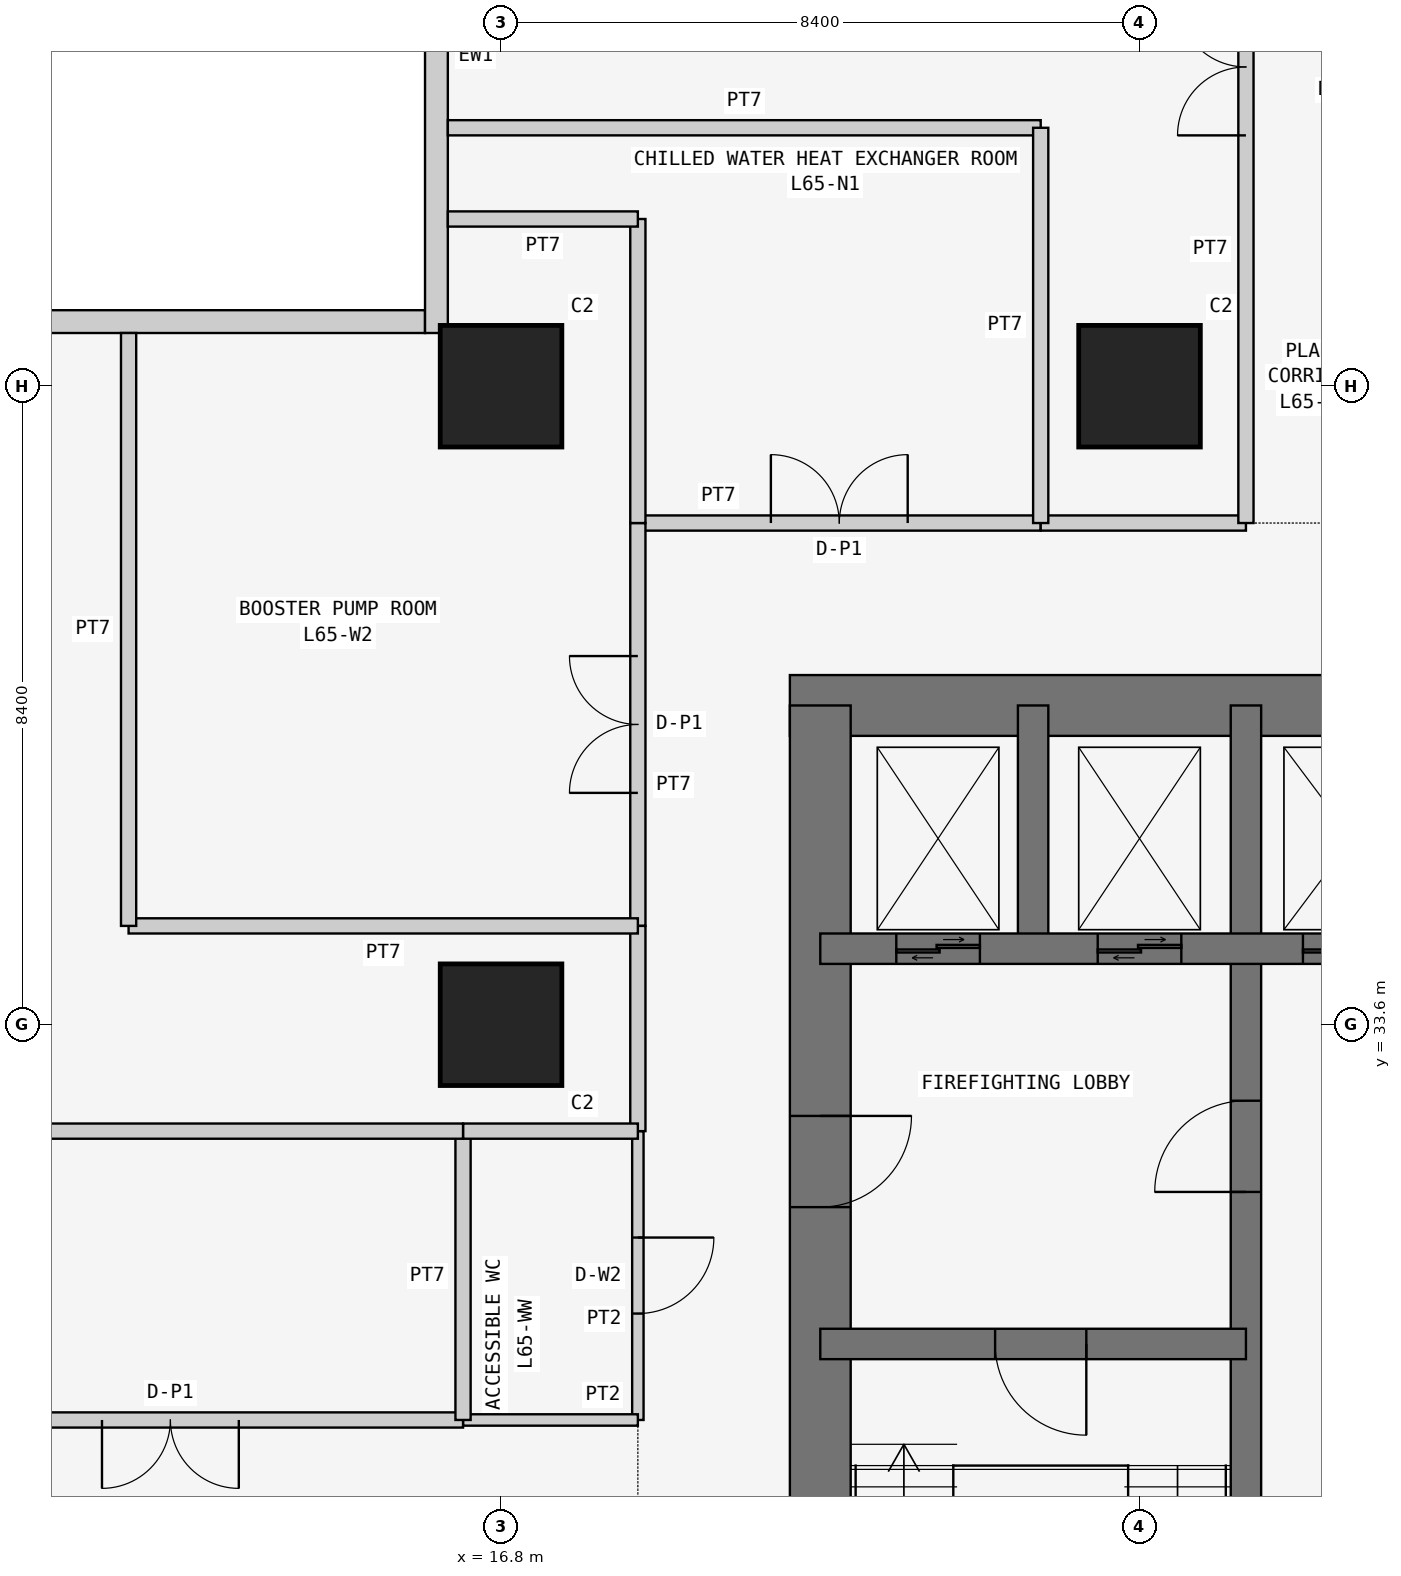
"""IFC4 building model, lengths in metres.
Left out: names, types, materials, properties, quantities, classifications, styles, units other than length and angle.
Written with IfcOpenShell. Run it as: python <this file> out.ifc"""

import sys

from ifc_helpers import new_model, si_unit, direction, frame, frame_2d, origin, origin_2d, place, context, subcontext, project, spatial, rectangle, extrude, element, fill, save


model = new_model("IFC4")
c1 = context("Model", 3, precision=1e-05, world=origin(), true_north=direction((0.0, 1.0)))
c2 = subcontext(c1, "Body", "Model", "MODEL_VIEW")
j1 = project(units=[si_unit("LENGTHUNIT", "METRE"), si_unit("PLANEANGLEUNIT", "RADIAN")], contexts=[c1])
p1 = place(None, origin())
s1 = spatial("IfcSite", under=j1, at=p1, CompositionType="ELEMENT")
p2 = place(p1, origin())
s2 = spatial("IfcBuilding", under=s1, at=p2, CompositionType="ELEMENT")
p3 = place(p2, frame((0.0, 0.0, 248.1)))
s3 = spatial("IfcBuildingStorey", under=s2, at=p3, CompositionType="ELEMENT", Elevation=248.1)
for number, where, z_axis, x_axis in (
    (1, (16.8, 33.6, 0.0), (0.0, 0.0, 1.0), (1.0, 0.0, 0.0)),
    (2, (16.8, 42.0, 0.0), (0.0, 0.0, 1.0), (1.0, 0.0, 0.0)),
    (3, (25.2, 42.0, 0.0), (0.0, 0.0, 1.0), (1.0, 0.0, 0.0)),
):
    element("IfcColumn", number, at=place(p3, frame(where, z_axis=z_axis, x_axis=x_axis)), inside=s3, PredefinedType="COLUMN", context=c2, shape_type="SweptSolid", body=[
        extrude(rectangle(XDim=1.6, YDim=1.6, at=origin_2d()), origin(), (0.0, 0.0, 1.0), 6.0),
    ])
p4 = place(p3, frame((37.8, 37.8, 0.0), z_axis=(0.0, 0.0, 1.0), x_axis=(-1.0, 0.0, 0.0)))
e4 = element("IfcWall", 4, at=p4, inside=s3, PredefinedType="SHEAR", context=c2, shape_type="SweptSolid", body=[
    extrude(rectangle(XDim=17.2, YDim=0.8, at=frame_2d((8.6, 0.0))), origin(), (0.0, 0.0, 1.0), 6.0),
])
p5 = place(p3, frame((21.0, 37.8, 0.0), z_axis=(0.0, 0.0, 1.0), x_axis=(0.0, -1.0, 0.0)))
e5 = element("IfcWall", 5, at=p5, inside=s3, PredefinedType="SHEAR", context=c2, shape_type="SweptSolid", body=[
    extrude(rectangle(XDim=17.2, YDim=0.8, at=frame_2d((8.6, 0.0))), origin(), (0.0, 0.0, 1.0), 6.0),
])
p6 = place(p5, frame((5.4, 0.0, 0.0)))
e6 = element("IfcOpeningElement", 6, at=p6, cuts=e5, PredefinedType="OPENING", context=c2, shape_type="SweptSolid", body=[
    extrude(rectangle(XDim=1.2, YDim=2.1, at=frame_2d((0.6, 1.05))), frame((0.0, 0.41, 0.0), z_axis=(0.0, -1.0, 0.0), x_axis=(1.0, 0.0, 0.0)), (0.0, 0.0, 1.0), 0.82),
])
p7 = place(p3, frame((26.6, 21.0, 0.0), z_axis=(0.0, 0.0, 1.0), x_axis=(0.0, 1.0, 0.0)))
e7 = element("IfcWall", 7, at=p7, inside=s3, PredefinedType="SHEAR", context=c2, shape_type="SweptSolid", body=[
    extrude(rectangle(XDim=16.8, YDim=0.4, at=frame_2d((8.4, 0.0))), origin(), (0.0, 0.0, 1.0), 6.0),
])
p8 = place(p7, frame((10.4, 0.0, 0.0)))
e8 = element("IfcOpeningElement", 8, at=p8, cuts=e7, PredefinedType="OPENING", context=c2, shape_type="SweptSolid", body=[
    extrude(rectangle(XDim=1.2, YDim=2.1, at=frame_2d((0.6, 1.05))), frame((0.0, 0.21, 0.0), z_axis=(0.0, -1.0, 0.0), x_axis=(1.0, 0.0, 0.0)), (0.0, 0.0, 1.0), 0.42),
])
p9 = place(p3, frame((21.0, 29.4, 0.0), z_axis=(0.0, 0.0, 1.0), x_axis=(1.0, 0.0, 0.0)))
e9 = element("IfcWall", 9, at=p9, inside=s3, PredefinedType="SHEAR", context=c2, shape_type="SweptSolid", body=[
    extrude(rectangle(XDim=5.6, YDim=0.4, at=frame_2d((2.8, 0.0))), origin(), (0.0, 0.0, 1.0), 6.0),
])
p10 = place(p9, frame((2.3, 0.0, 0.0)))
e10 = element("IfcOpeningElement", 10, at=p10, cuts=e9, PredefinedType="OPENING", context=c2, shape_type="SweptSolid", body=[
    extrude(rectangle(XDim=1.2, YDim=2.1, at=frame_2d((0.6, 1.05))), frame((0.0, 0.21, 0.0), z_axis=(0.0, -1.0, 0.0), x_axis=(1.0, 0.0, 0.0)), (0.0, 0.0, 1.0), 0.42),
])
p11 = place(p3, frame((21.0, 34.6, 0.0), z_axis=(0.0, 0.0, 1.0), x_axis=(1.0, 0.0, 0.0)))
e11 = element("IfcWall", 11, at=p11, inside=s3, PredefinedType="SHEAR", context=c2, shape_type="SweptSolid", body=[
    extrude(rectangle(XDim=11.2, YDim=0.4, at=frame_2d((5.6, 0.0))), origin(), (0.0, 0.0, 1.0), 6.0),
])
p12 = place(p11, frame((1.0, 0.0, 0.0)))
e12 = element("IfcOpeningElement", 12, at=p12, cuts=e11, PredefinedType="OPENING", context=c2, shape_type="SweptSolid", body=[
    extrude(rectangle(XDim=1.1, YDim=2.1, at=frame_2d((0.55, 1.05))), frame((0.0, 0.21, 0.0), z_axis=(0.0, -1.0, 0.0), x_axis=(1.0, 0.0, 0.0)), (0.0, 0.0, 1.0), 0.42),
])
p13 = place(p11, frame((3.65, 0.0, 0.0)))
e13 = element("IfcOpeningElement", 13, at=p13, cuts=e11, PredefinedType="OPENING", context=c2, shape_type="SweptSolid", body=[
    extrude(rectangle(XDim=1.1, YDim=2.1, at=frame_2d((0.55, 1.05))), frame((0.0, 0.21, 0.0), z_axis=(0.0, -1.0, 0.0), x_axis=(1.0, 0.0, 0.0)), (0.0, 0.0, 1.0), 0.42),
])
p14 = place(p11, frame((6.35, 0.0, 0.0)))
e14 = element("IfcOpeningElement", 14, at=p14, cuts=e11, PredefinedType="OPENING", context=c2, shape_type="SweptSolid", body=[
    extrude(rectangle(XDim=1.3, YDim=2.1, at=frame_2d((0.65, 1.05))), frame((0.0, 0.21, 0.0), z_axis=(0.0, -1.0, 0.0), x_axis=(1.0, 0.0, 0.0)), (0.0, 0.0, 1.0), 0.42),
])
p15 = place(p3, frame((23.8, 34.6, 0.0), z_axis=(0.0, 0.0, 1.0), x_axis=(0.0, 1.0, 0.0)))
e15 = element("IfcWall", 15, at=p15, inside=s3, PredefinedType="SHEAR", context=c2, shape_type="SweptSolid", body=[
    extrude(rectangle(XDim=3.2, YDim=0.4, at=frame_2d((1.6, 0.0))), origin(), (0.0, 0.0, 1.0), 6.0),
])
p16 = place(p3, frame((15.8, 42.85, 0.0), z_axis=(0.0, 0.0, 1.0), x_axis=(-1.0, 0.0, 0.0)))
e16 = element("IfcWall", 16, at=p16, inside=s3, PredefinedType="SOLIDWALL", context=c2, shape_type="SweptSolid", body=[
    extrude(rectangle(XDim=15.4, YDim=0.3, at=frame_2d((7.7, 0.0))), origin(), (0.0, 0.0, 1.0), 5.85),
])
p17 = place(p3, frame((15.95, 50.0, 0.0), z_axis=(0.0, 0.0, 1.0), x_axis=(0.0, -1.0, 0.0)))
e17 = element("IfcWall", 17, at=p17, inside=s3, PredefinedType="SOLIDWALL", context=c2, shape_type="SweptSolid", body=[
    extrude(rectangle(XDim=7.3, YDim=0.3, at=frame_2d((3.65, 0.0))), origin(), (0.0, 0.0, 1.0), 5.85),
])
p18 = place(p3, frame((18.6, 40.2, 0.0), z_axis=(0.0, 0.0, 1.0), x_axis=(1.0, 0.0, 0.0)))
e18 = element("IfcWall", 18, at=p18, inside=s3, PredefinedType="PARTITIONING", context=c2, shape_type="SweptSolid", body=[
    extrude(rectangle(XDim=5.3, YDim=0.2, at=frame_2d((2.65, 0.0))), origin(), (0.0, 0.0, 1.0), 5.85),
])
p19 = place(p18, frame((1.75, 0.0, 0.0)))
e19 = element("IfcOpeningElement", 19, at=p19, cuts=e18, PredefinedType="OPENING", context=c2, shape_type="SweptSolid", body=[
    extrude(rectangle(XDim=1.8, YDim=2.4, at=frame_2d((0.9, 1.2))), frame((0.0, 0.11, 0.0), z_axis=(0.0, -1.0, 0.0), x_axis=(1.0, 0.0, 0.0)), (0.0, 0.0, 1.0), 0.22),
])
p20 = place(p3, frame((23.9, 40.2, 0.0), z_axis=(0.0, 0.0, 1.0), x_axis=(1.0, 0.0, 0.0)))
e20 = element("IfcWall", 20, at=p20, inside=s3, PredefinedType="PARTITIONING", context=c2, shape_type="SweptSolid", body=[
    extrude(rectangle(XDim=2.7, YDim=0.2, at=frame_2d((1.35, 0.0))), origin(), (0.0, 0.0, 1.0), 5.85),
])
p21 = place(p3, frame((18.6, 34.9, 0.0), z_axis=(0.0, 0.0, 1.0), x_axis=(0.0, 1.0, 0.0)))
e21 = element("IfcWall", 21, at=p21, inside=s3, PredefinedType="PARTITIONING", context=c2, shape_type="SweptSolid", body=[
    extrude(rectangle(XDim=5.3, YDim=0.2, at=frame_2d((2.65, 0.0))), origin(), (0.0, 0.0, 1.0), 5.85),
])
p22 = place(p21, frame((1.75, 0.0, 0.0)))
e22 = element("IfcOpeningElement", 22, at=p22, cuts=e21, PredefinedType="OPENING", context=c2, shape_type="SweptSolid", body=[
    extrude(rectangle(XDim=1.8, YDim=2.4, at=frame_2d((0.9, 1.2))), frame((0.0, 0.11, 0.0), z_axis=(0.0, -1.0, 0.0), x_axis=(1.0, 0.0, 0.0)), (0.0, 0.0, 1.0), 0.22),
])
p23 = place(p3, frame((18.6, 28.4, 0.0), z_axis=(0.0, 0.0, 1.0), x_axis=(0.0, 1.0, 0.0)))
e23 = element("IfcWall", 23, at=p23, inside=s3, PredefinedType="PARTITIONING", context=c2, shape_type="SweptSolid", body=[
    extrude(rectangle(XDim=3.8, YDim=0.15, at=frame_2d((1.9, 0.0))), origin(), (0.0, 0.0, 1.0), 5.85),
])
p24 = place(p23, frame((1.4, 0.0, 0.0)))
e24 = element("IfcOpeningElement", 24, at=p24, cuts=e23, PredefinedType="OPENING", context=c2, shape_type="SweptSolid", body=[
    extrude(rectangle(XDim=1.0, YDim=2.1, at=frame_2d((0.5, 1.05))), frame((0.0, 0.085, 0.0), z_axis=(0.0, -1.0, 0.0), x_axis=(1.0, 0.0, 0.0)), (0.0, 0.0, 1.0), 0.17),
])
p25 = place(p3, frame((18.6, 32.2, 0.0), z_axis=(0.0, 0.0, 1.0), x_axis=(0.0, 1.0, 0.0)))
e25 = element("IfcWall", 25, at=p25, inside=s3, PredefinedType="PARTITIONING", context=c2, shape_type="SweptSolid", body=[
    extrude(rectangle(XDim=2.7, YDim=0.2, at=frame_2d((1.35, 0.0))), origin(), (0.0, 0.0, 1.0), 5.85),
])
p26 = place(p3, frame((16.1, 45.4, 0.0), z_axis=(0.0, 0.0, 1.0), x_axis=(1.0, 0.0, 0.0)))
e26 = element("IfcWall", 26, at=p26, inside=s3, PredefinedType="PARTITIONING", context=c2, shape_type="SweptSolid", body=[
    extrude(rectangle(XDim=7.8, YDim=0.2, at=frame_2d((3.9, 0.0))), origin(), (0.0, 0.0, 1.0), 5.85),
])
p27 = place(p3, frame((23.9, 45.4, 0.0), z_axis=(0.0, 0.0, 1.0), x_axis=(0.0, -1.0, 0.0)))
e27 = element("IfcWall", 27, at=p27, inside=s3, PredefinedType="PARTITIONING", context=c2, shape_type="SweptSolid", body=[
    extrude(rectangle(XDim=5.2, YDim=0.2, at=frame_2d((2.6, 0.0))), origin(), (0.0, 0.0, 1.0), 5.85),
])
p28 = place(p3, frame((18.6, 40.2, 0.0), z_axis=(0.0, 0.0, 1.0), x_axis=(0.0, 1.0, 0.0)))
e28 = element("IfcWall", 28, at=p28, inside=s3, PredefinedType="PARTITIONING", context=c2, shape_type="SweptSolid", body=[
    extrude(rectangle(XDim=4.0, YDim=0.2, at=frame_2d((2.0, 0.0))), origin(), (0.0, 0.0, 1.0), 5.85),
])
p29 = place(p3, frame((18.6, 44.2, 0.0), z_axis=(0.0, 0.0, 1.0), x_axis=(-1.0, 0.0, 0.0)))
e29 = element("IfcWall", 29, at=p29, inside=s3, PredefinedType="PARTITIONING", context=c2, shape_type="SweptSolid", body=[
    extrude(rectangle(XDim=2.5, YDim=0.2, at=frame_2d((1.25, 0.0))), origin(), (0.0, 0.0, 1.0), 5.85),
])
p30 = place(p3, frame((26.6, 40.2, 0.0), z_axis=(0.0, 0.0, 1.0), x_axis=(0.0, 1.0, 0.0)))
e30 = element("IfcWall", 30, at=p30, inside=s3, PredefinedType="PARTITIONING", context=c2, shape_type="SweptSolid", body=[
    extrude(rectangle(XDim=7.2, YDim=0.2, at=frame_2d((3.6, 0.0))), origin(), (0.0, 0.0, 1.0), 5.85),
])
p31 = place(p30, frame((5.1, 0.0, 0.0)))
e31 = element("IfcOpeningElement", 31, at=p31, cuts=e30, PredefinedType="OPENING", context=c2, shape_type="SweptSolid", body=[
    extrude(rectangle(XDim=1.8, YDim=2.4, at=frame_2d((0.9, 1.2))), frame((0.0, 0.11, 0.0), z_axis=(0.0, -1.0, 0.0), x_axis=(1.0, 0.0, 0.0)), (0.0, 0.0, 1.0), 0.22),
])
p32 = place(p3, frame((18.6, 34.9, 0.0), z_axis=(0.0, 0.0, 1.0), x_axis=(-1.0, 0.0, 0.0)))
e32 = element("IfcWall", 32, at=p32, inside=s3, PredefinedType="PARTITIONING", context=c2, shape_type="SweptSolid", body=[
    extrude(rectangle(XDim=6.7, YDim=0.2, at=frame_2d((3.35, 0.0))), origin(), (0.0, 0.0, 1.0), 5.85),
])
p33 = place(p3, frame((11.9, 34.9, 0.0), z_axis=(0.0, 0.0, 1.0), x_axis=(0.0, 1.0, 0.0)))
e33 = element("IfcWall", 33, at=p33, inside=s3, PredefinedType="PARTITIONING", context=c2, shape_type="SweptSolid", body=[
    extrude(rectangle(XDim=7.8, YDim=0.2, at=frame_2d((3.9, 0.0))), origin(), (0.0, 0.0, 1.0), 5.85),
])
p34 = place(p3, frame((16.3, 28.4, 0.0), z_axis=(0.0, 0.0, 1.0), x_axis=(1.0, 0.0, 0.0)))
e34 = element("IfcWall", 34, at=p34, inside=s3, PredefinedType="PARTITIONING", context=c2, shape_type="SweptSolid", body=[
    extrude(rectangle(XDim=2.3, YDim=0.15, at=frame_2d((1.15, 0.0))), origin(), (0.0, 0.0, 1.0), 5.85),
])
p35 = place(p3, frame((1.4, 28.4, 0.0), z_axis=(0.0, 0.0, 1.0), x_axis=(1.0, 0.0, 0.0)))
e35 = element("IfcWall", 35, at=p35, inside=s3, PredefinedType="PARTITIONING", context=c2, shape_type="SweptSolid", body=[
    extrude(rectangle(XDim=14.9, YDim=0.2, at=frame_2d((7.45, 0.0))), origin(), (0.0, 0.0, 1.0), 5.75),
])
p36 = place(p35, frame((10.15, 0.0, 0.0)))
e36 = element("IfcOpeningElement", 36, at=p36, cuts=e35, PredefinedType="OPENING", context=c2, shape_type="SweptSolid", body=[
    extrude(rectangle(XDim=1.8, YDim=2.4, at=frame_2d((0.9, 1.2))), frame((0.0, 0.11, 0.0), z_axis=(0.0, -1.0, 0.0), x_axis=(1.0, 0.0, 0.0)), (0.0, 0.0, 1.0), 0.22),
])
p37 = place(p3, frame((16.3, 28.4, 0.0), z_axis=(0.0, 0.0, 1.0), x_axis=(0.0, 1.0, 0.0)))
e37 = element("IfcWall", 37, at=p37, inside=s3, PredefinedType="PARTITIONING", context=c2, shape_type="SweptSolid", body=[
    extrude(rectangle(XDim=3.8, YDim=0.2, at=frame_2d((1.9, 0.0))), origin(), (0.0, 0.0, 1.0), 5.85),
])
p38 = place(p3, frame((16.3, 32.2, 0.0), z_axis=(0.0, 0.0, 1.0), x_axis=(1.0, 0.0, 0.0)))
e38 = element("IfcWall", 38, at=p38, inside=s3, PredefinedType="PARTITIONING", context=c2, shape_type="SweptSolid", body=[
    extrude(rectangle(XDim=2.3, YDim=0.2, at=frame_2d((1.15, 0.0))), origin(), (0.0, 0.0, 1.0), 5.85),
])
p39 = place(p3, frame((1.4, 32.2, 0.0), z_axis=(0.0, 0.0, 1.0), x_axis=(1.0, 0.0, 0.0)))
e39 = element("IfcWall", 39, at=p39, inside=s3, PredefinedType="PARTITIONING", context=c2, shape_type="SweptSolid", body=[
    extrude(rectangle(XDim=14.9, YDim=0.2, at=frame_2d((7.45, 0.0))), origin(), (0.0, 0.0, 1.0), 5.75),
])
p40 = place(p19, origin())
e40 = element("IfcDoor", 40, at=p40, inside=s3, OperationType="DOUBLE_DOOR_SINGLE_SWING", PredefinedType="DOOR", context=c2, shape_type="SweptSolid", body=[
    extrude(rectangle(XDim=1.8, YDim=2.4, at=frame_2d((0.9, 1.2))), frame((0.0, 0.025, 0.0), z_axis=(0.0, -1.0, 0.0), x_axis=(1.0, 0.0, 0.0)), (0.0, 0.0, 1.0), 0.05),
])
fill(e19, e40)
p41 = place(p31, origin())
e41 = element("IfcDoor", 41, at=p41, inside=s3, OperationType="DOUBLE_DOOR_SINGLE_SWING", PredefinedType="DOOR", context=c2, shape_type="SweptSolid", body=[
    extrude(rectangle(XDim=1.8, YDim=2.4, at=frame_2d((0.9, 1.2))), frame((0.0, 0.025, 0.0), z_axis=(0.0, -1.0, 0.0), x_axis=(1.0, 0.0, 0.0)), (0.0, 0.0, 1.0), 0.05),
])
fill(e31, e41)
p42 = place(p22, origin())
e42 = element("IfcDoor", 42, at=p42, inside=s3, OperationType="DOUBLE_DOOR_SINGLE_SWING", PredefinedType="DOOR", context=c2, shape_type="SweptSolid", body=[
    extrude(rectangle(XDim=1.8, YDim=2.4, at=frame_2d((0.9, 1.2))), frame((0.0, 0.025, 0.0), z_axis=(0.0, -1.0, 0.0), x_axis=(1.0, 0.0, 0.0)), (0.0, 0.0, 1.0), 0.05),
])
fill(e22, e42)
p43 = place(p24, frame((1.0, 0.0, 0.0), z_axis=(0.0, 0.0, 1.0), x_axis=(-1.0, 0.0, 0.0)))
e43 = element("IfcDoor", 43, at=p43, inside=s3, OperationType="SINGLE_SWING_LEFT", PredefinedType="DOOR", context=c2, shape_type="SweptSolid", body=[
    extrude(rectangle(XDim=1.0, YDim=2.1, at=frame_2d((0.5, 1.05))), frame((0.0, 0.025, 0.0), z_axis=(0.0, -1.0, 0.0), x_axis=(1.0, 0.0, 0.0)), (0.0, 0.0, 1.0), 0.05),
])
fill(e24, e43)
p44 = place(p36, frame((1.8, 0.0, 0.0), z_axis=(0.0, 0.0, 1.0), x_axis=(-1.0, 0.0, 0.0)))
e44 = element("IfcDoor", 44, at=p44, inside=s3, OperationType="DOUBLE_DOOR_SINGLE_SWING", PredefinedType="DOOR", context=c2, shape_type="SweptSolid", body=[
    extrude(rectangle(XDim=1.8, YDim=2.4, at=frame_2d((0.9, 1.2))), frame((0.0, 0.025, 0.0), z_axis=(0.0, -1.0, 0.0), x_axis=(1.0, 0.0, 0.0)), (0.0, 0.0, 1.0), 0.05),
])
fill(e36, e44)
p45 = place(p6, origin())
e45 = element("IfcDoor", 45, at=p45, inside=s3, OperationType="SINGLE_SWING_LEFT", PredefinedType="DOOR", context=c2, shape_type="SweptSolid", body=[
    extrude(rectangle(XDim=1.2, YDim=2.1, at=frame_2d((0.6, 1.05))), frame((0.0, 0.025, 0.0), z_axis=(0.0, -1.0, 0.0), x_axis=(1.0, 0.0, 0.0)), (0.0, 0.0, 1.0), 0.05),
])
fill(e6, e45)
p46 = place(p10, frame((1.2, 0.0, 0.0), z_axis=(0.0, 0.0, 1.0), x_axis=(-1.0, 0.0, 0.0)))
e46 = element("IfcDoor", 46, at=p46, inside=s3, OperationType="SINGLE_SWING_LEFT", PredefinedType="DOOR", context=c2, shape_type="SweptSolid", body=[
    extrude(rectangle(XDim=1.2, YDim=2.1, at=frame_2d((0.6, 1.05))), frame((0.0, 0.025, 0.0), z_axis=(0.0, -1.0, 0.0), x_axis=(1.0, 0.0, 0.0)), (0.0, 0.0, 1.0), 0.05),
])
fill(e10, e46)
p47 = place(p8, origin())
e47 = element("IfcDoor", 47, at=p47, inside=s3, OperationType="SINGLE_SWING_LEFT", PredefinedType="DOOR", context=c2, shape_type="SweptSolid", body=[
    extrude(rectangle(XDim=1.2, YDim=2.1, at=frame_2d((0.6, 1.05))), frame((0.0, 0.025, 0.0), z_axis=(0.0, -1.0, 0.0), x_axis=(1.0, 0.0, 0.0)), (0.0, 0.0, 1.0), 0.05),
])
fill(e8, e47)
p48 = place(p12, origin())
e48 = element("IfcDoor", 48, at=p48, inside=s3, OperationType="DOUBLE_DOOR_SLIDING", PredefinedType="DOOR", context=c2, shape_type="SweptSolid", body=[
    extrude(rectangle(XDim=1.1, YDim=2.1, at=frame_2d((0.55, 1.05))), frame((0.0, 0.025, 0.0), z_axis=(0.0, -1.0, 0.0), x_axis=(1.0, 0.0, 0.0)), (0.0, 0.0, 1.0), 0.05),
])
fill(e12, e48)
p49 = place(p13, origin())
e49 = element("IfcDoor", 49, at=p49, inside=s3, OperationType="DOUBLE_DOOR_SLIDING", PredefinedType="DOOR", context=c2, shape_type="SweptSolid", body=[
    extrude(rectangle(XDim=1.1, YDim=2.1, at=frame_2d((0.55, 1.05))), frame((0.0, 0.025, 0.0), z_axis=(0.0, -1.0, 0.0), x_axis=(1.0, 0.0, 0.0)), (0.0, 0.0, 1.0), 0.05),
])
fill(e13, e49)
p50 = place(p14, origin())
e50 = element("IfcDoor", 50, at=p50, inside=s3, OperationType="DOUBLE_DOOR_SLIDING", PredefinedType="DOOR", context=c2, shape_type="SweptSolid", body=[
    extrude(rectangle(XDim=1.3, YDim=2.1, at=frame_2d((0.65, 1.05))), frame((0.0, 0.025, 0.0), z_axis=(0.0, -1.0, 0.0), x_axis=(1.0, 0.0, 0.0)), (0.0, 0.0, 1.0), 0.05),
])
fill(e14, e50)
save(model, sys.argv[1])
